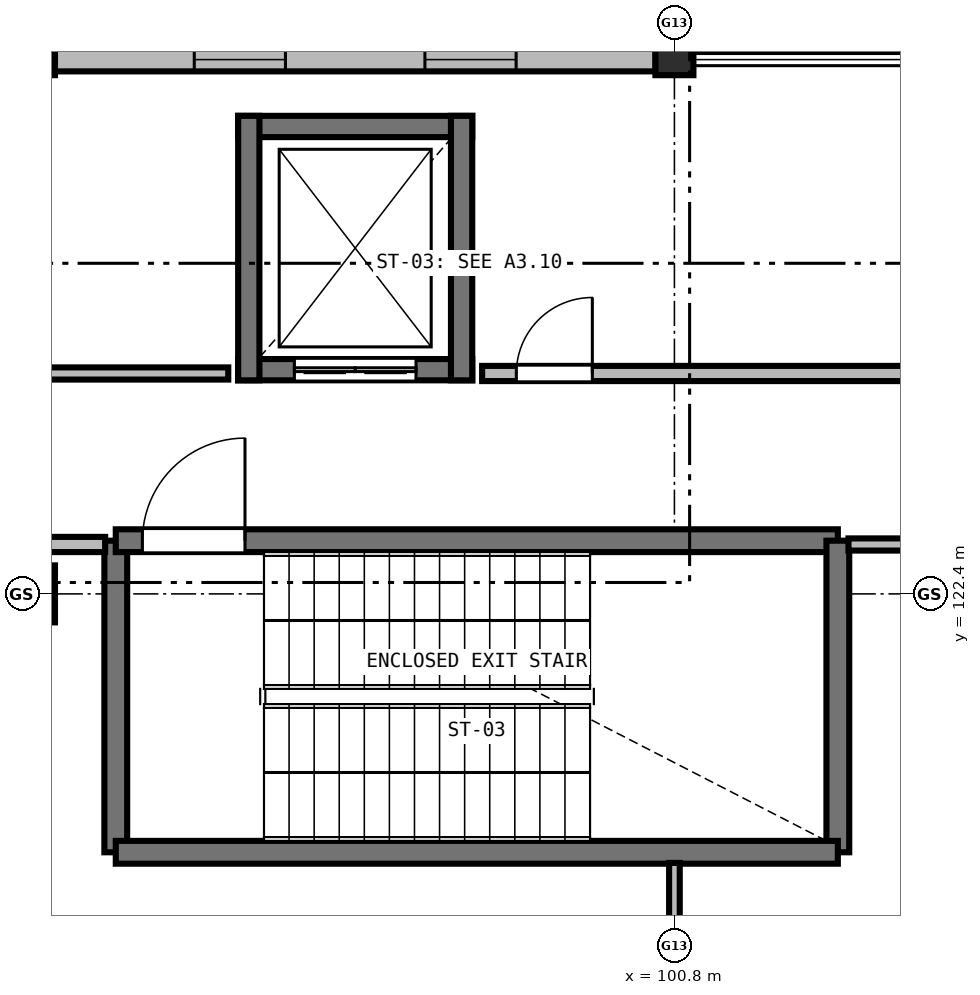
"""IFC4 building model, lengths in metres.
Left out: names, types, materials, properties, quantities, classifications, styles, units other than length and angle.
Written with IfcOpenShell. Run it as: python <this file> out.ifc"""

import sys

from ifc_helpers import new_model, si_unit, direction, frame, frame_2d, origin, origin_2d, place, context, subcontext, project, spatial, rectangle, extrude, element, fill, save


model = new_model("IFC4")
c1 = context("Model", 3, precision=1e-05, world=origin(), true_north=direction((0.0, 1.0)))
c2 = subcontext(c1, "Body", "Model", "MODEL_VIEW")
j1 = project(units=[si_unit("LENGTHUNIT", "METRE"), si_unit("PLANEANGLEUNIT", "RADIAN")], contexts=[c1])
p1 = place(None, origin())
s1 = spatial("IfcSite", under=j1, at=p1, CompositionType="ELEMENT")
p2 = place(p1, origin())
s2 = spatial("IfcBuilding", under=s1, at=p2, CompositionType="ELEMENT")
p3 = place(p2, frame((0.0, 0.0, 13.5)))
s3 = spatial("IfcBuildingStorey", under=s2, at=p3, CompositionType="ELEMENT", Elevation=13.5)
for number, where, z_axis, x_axis in (
    (1, (92.4, 122.4, 0.0), (0.0, 0.0, 1.0), (1.0, 0.0, 0.0)),
    (2, (92.4, 129.6, 0.0), (0.0, 0.0, 1.0), (1.0, 0.0, 0.0)),
    (3, (100.8, 129.6, 0.0), (0.0, 0.0, 1.0), (1.0, 0.0, 0.0)),
):
    element("IfcColumn", number, at=place(p3, frame(where, z_axis=z_axis, x_axis=x_axis)), inside=s3, PredefinedType="COLUMN", context=c2, shape_type="SweptSolid", body=[
        extrude(rectangle(XDim=0.5, YDim=0.75, at=origin_2d()), origin(), (0.0, 0.0, 1.0), 4.2),
    ])
p4 = place(p3, frame((92.648, 129.43, 0.0), z_axis=(0.0, 0.0, 1.0), x_axis=(1.0, 0.0, 0.0)))
e4 = element("IfcWall", 4, at=p4, inside=s3, PredefinedType="SOLIDWALL", context=c2, shape_type="SweptSolid", body=[
    extrude(rectangle(XDim=7.904, YDim=0.31, at=frame_2d((3.952, 0.0))), origin(), (0.0, 0.0, 1.0), 3.16),
])
p5 = place(p4, frame((1.835, 0.0, 0.95)))
e5 = element("IfcOpeningElement", 5, at=p5, cuts=e4, PredefinedType="OPENING", context=c2, shape_type="SweptSolid", body=[
    extrude(rectangle(XDim=1.2, YDim=1.8, at=frame_2d((0.6, 0.9))), frame((0.0, 0.165, 0.0), z_axis=(0.0, -1.0, 0.0), x_axis=(1.0, 0.0, 0.0)), (0.0, 0.0, 1.0), 0.33),
])
p6 = place(p4, frame((4.869, 0.0, 0.95)))
e6 = element("IfcOpeningElement", 6, at=p6, cuts=e4, PredefinedType="OPENING", context=c2, shape_type="SweptSolid", body=[
    extrude(rectangle(XDim=1.2, YDim=1.8, at=frame_2d((0.6, 0.9))), frame((0.0, 0.165, 0.0), z_axis=(0.0, -1.0, 0.0), x_axis=(1.0, 0.0, 0.0)), (0.0, 0.0, 1.0), 0.33),
])
p7 = place(p3, frame((93.45, 119.0, 0.0), z_axis=(0.0, 0.0, 1.0), x_axis=(0.0, 1.0, 0.0)))
e7 = element("IfcWall", 7, at=p7, inside=s3, PredefinedType="SHEAR", context=c2, shape_type="SweptSolid", body=[
    extrude(rectangle(XDim=4.1, YDim=0.3, at=frame_2d((2.05, 0.0))), origin(), (0.0, 0.0, 1.0), 3.88),
])
p8 = place(p3, frame((93.45, 123.1, 0.0), z_axis=(0.0, 0.0, 1.0), x_axis=(1.0, 0.0, 0.0)))
e8 = element("IfcWall", 8, at=p8, inside=s3, PredefinedType="SHEAR", context=c2, shape_type="SweptSolid", body=[
    extrude(rectangle(XDim=9.5, YDim=0.3, at=frame_2d((4.75, 0.0))), origin(), (0.0, 0.0, 1.0), 3.88),
])
p9 = place(p8, frame((0.35, 0.0, 0.0)))
e9 = element("IfcOpeningElement", 9, at=p9, cuts=e8, PredefinedType="OPENING", context=c2, shape_type="SweptSolid", body=[
    extrude(rectangle(XDim=1.35, YDim=2.2, at=frame_2d((0.675, 1.1))), frame((0.0, 0.16, 0.0), z_axis=(0.0, -1.0, 0.0), x_axis=(1.0, 0.0, 0.0)), (0.0, 0.0, 1.0), 0.32),
])
p10 = place(p3, frame((102.95, 123.1, 0.0), z_axis=(0.0, 0.0, 1.0), x_axis=(0.0, -1.0, 0.0)))
e10 = element("IfcWall", 10, at=p10, inside=s3, PredefinedType="SHEAR", context=c2, shape_type="SweptSolid", body=[
    extrude(rectangle(XDim=4.1, YDim=0.3, at=frame_2d((2.05, 0.0))), origin(), (0.0, 0.0, 1.0), 3.88),
])
p11 = place(p3, frame((102.95, 119.0, 0.0), z_axis=(0.0, 0.0, 1.0), x_axis=(-1.0, 0.0, 0.0)))
e11 = element("IfcWall", 11, at=p11, inside=s3, PredefinedType="SHEAR", context=c2, shape_type="SweptSolid", body=[
    extrude(rectangle(XDim=9.5, YDim=0.3, at=frame_2d((4.75, 0.0))), origin(), (0.0, 0.0, 1.0), 3.88),
])
p12 = place(p3, frame((98.14, 125.35, 0.0), z_axis=(0.0, 0.0, 1.0), x_axis=(-1.0, 0.0, 0.0)))
e12 = element("IfcWall", 12, at=p12, inside=s3, PredefinedType="SHEAR", context=c2, shape_type="SweptSolid", body=[
    extrude(rectangle(XDim=3.08, YDim=0.28, at=frame_2d((1.54, 0.0))), origin(), (0.0, 0.0, 1.0), 3.88),
])
p13 = place(p12, frame((0.74, 0.0, 0.0)))
e13 = element("IfcOpeningElement", 13, at=p13, cuts=e12, PredefinedType="OPENING", context=c2, shape_type="SweptSolid", body=[
    extrude(rectangle(XDim=1.6, YDim=2.2, at=frame_2d((0.8, 1.1))), frame((0.0, 0.15, 0.0), z_axis=(0.0, -1.0, 0.0), x_axis=(1.0, 0.0, 0.0)), (0.0, 0.0, 1.0), 0.3),
])
p14 = place(p3, frame((95.06, 128.55, 0.0), z_axis=(0.0, 0.0, 1.0), x_axis=(1.0, 0.0, 0.0)))
e14 = element("IfcWall", 14, at=p14, inside=s3, PredefinedType="SHEAR", context=c2, shape_type="SweptSolid", body=[
    extrude(rectangle(XDim=3.08, YDim=0.28, at=frame_2d((1.54, 0.0))), origin(), (0.0, 0.0, 1.0), 3.88),
])
for number, where, z_axis, x_axis in (
    (15, (95.2, 125.21, 0.0), (0.0, 0.0, 1.0), (0.0, 1.0, 0.0)),
    (16, (98.0, 128.69, 0.0), (0.0, 0.0, 1.0), (0.0, -1.0, 0.0)),
):
    element("IfcWall", number, at=place(p3, frame(where, z_axis=z_axis, x_axis=x_axis)), inside=s3, PredefinedType="SHEAR", context=c2, shape_type="SweptSolid", body=[
        extrude(rectangle(XDim=3.48, YDim=0.28, at=frame_2d((1.74, 0.0))), origin(), (0.0, 0.0, 1.0), 3.88),
    ])
p15 = place(p3, frame((92.4, 125.3, 0.0), z_axis=(0.0, 0.0, 1.0), x_axis=(1.0, 0.0, 0.0)))
e17 = element("IfcWall", 17, at=p15, inside=s3, PredefinedType="PARTITIONING", context=c2, shape_type="SweptSolid", body=[
    extrude(rectangle(XDim=2.53, YDim=0.16, at=frame_2d((1.265, 0.0))), origin(), (0.0, 0.0, 1.0), 3.355),
])
p16 = place(p3, frame((98.27, 125.3, 0.0), z_axis=(0.0, 0.0, 1.0), x_axis=(1.0, 0.0, 0.0)))
e18 = element("IfcWall", 18, at=p16, inside=s3, PredefinedType="SOLIDWALL", context=c2, shape_type="SweptSolid", body=[
    extrude(rectangle(XDim=35.91, YDim=0.2, at=frame_2d((17.955, 0.0))), origin(), (0.0, 0.0, 1.0), 3.355),
])
p17 = place(p16, frame((0.45, 0.0, 0.0)))
e19 = element("IfcOpeningElement", 19, at=p17, cuts=e18, PredefinedType="OPENING", context=c2, shape_type="SweptSolid", body=[
    extrude(rectangle(XDim=1.0, YDim=2.1, at=frame_2d((0.5, 1.05))), frame((0.0, 0.11, 0.0), z_axis=(0.0, -1.0, 0.0), x_axis=(1.0, 0.0, 0.0)), (0.0, 0.0, 1.0), 0.22),
])
p18 = place(p3, frame((93.31, 123.05, 0.0), z_axis=(0.0, 0.0, 1.0), x_axis=(-1.0, 0.0, 0.0)))
e20 = element("IfcWall", 20, at=p18, inside=s3, PredefinedType="SOLIDWALL", context=c2, shape_type="SweptSolid", body=[
    extrude(rectangle(XDim=32.22, YDim=0.2, at=frame_2d((16.11, 0.0))), origin(), (0.0, 0.0, 1.0), 3.355),
])
p19 = place(p18, frame((27.385, 0.0, 0.0)))
e21 = element("IfcOpeningElement", 21, at=p19, cuts=e20, PredefinedType="OPENING", context=c2, shape_type="SweptSolid", body=[
    extrude(rectangle(XDim=1.65, YDim=2.2, at=frame_2d((0.825, 1.1))), frame((0.0, 0.11, 0.0), z_axis=(0.0, -1.0, 0.0), x_axis=(1.0, 0.0, 0.0)), (0.0, 0.0, 1.0), 0.22),
])
p20 = place(p3, frame((100.8, 115.47, 0.0), z_axis=(0.0, 0.0, 1.0), x_axis=(0.0, 1.0, 0.0)))
e22 = element("IfcWall", 22, at=p20, inside=s3, PredefinedType="PARTITIONING", context=c2, shape_type="SweptSolid", body=[
    extrude(rectangle(XDim=3.39, YDim=0.14, at=frame_2d((1.695, 0.0))), origin(), (0.0, 0.0, 1.0), 3.155),
])
p21 = place(p3, frame((134.18, 123.05, 0.0), z_axis=(0.0, 0.0, 1.0), x_axis=(-1.0, 0.0, 0.0)))
e23 = element("IfcWall", 23, at=p21, inside=s3, PredefinedType="PARTITIONING", context=c2, shape_type="SweptSolid", body=[
    extrude(rectangle(XDim=31.09, YDim=0.16, at=frame_2d((15.545, 0.0))), origin(), (0.0, 0.0, 1.0), 3.355),
])
p22 = place(p21, frame((28.53, 0.0, 0.0)))
e24 = element("IfcOpeningElement", 24, at=p22, cuts=e23, PredefinedType="OPENING", context=c2, shape_type="SweptSolid", body=[
    extrude(rectangle(XDim=1.3, YDim=2.15, at=frame_2d((0.65, 1.075))), frame((0.0, 0.09, 0.0), z_axis=(0.0, -1.0, 0.0), x_axis=(1.0, 0.0, 0.0)), (0.0, 0.0, 1.0), 0.18),
])
p23 = place(p5, origin())
e25 = element("IfcWindow", 25, at=p23, inside=s3, PartitioningType="SINGLE_PANEL", PredefinedType="WINDOW", context=c2, shape_type="SweptSolid", body=[
    extrude(rectangle(XDim=1.2, YDim=1.8, at=frame_2d((0.6, 0.9))), frame((0.0, 0.03, 0.0), z_axis=(0.0, -1.0, 0.0), x_axis=(1.0, 0.0, 0.0)), (0.0, 0.0, 1.0), 0.06),
])
fill(e5, e25)
p24 = place(p6, origin())
e26 = element("IfcWindow", 26, at=p24, inside=s3, PartitioningType="SINGLE_PANEL", PredefinedType="WINDOW", context=c2, shape_type="SweptSolid", body=[
    extrude(rectangle(XDim=1.2, YDim=1.8, at=frame_2d((0.6, 0.9))), frame((0.0, 0.03, 0.0), z_axis=(0.0, -1.0, 0.0), x_axis=(1.0, 0.0, 0.0)), (0.0, 0.0, 1.0), 0.06),
])
fill(e6, e26)
p25 = place(p9, origin())
e27 = element("IfcDoor", 27, at=p25, inside=s3, OperationType="SINGLE_SWING_RIGHT", PredefinedType="DOOR", context=c2, shape_type="SweptSolid", body=[
    extrude(rectangle(XDim=1.35, YDim=2.2, at=frame_2d((0.675, 1.1))), frame((0.0, 0.025, 0.0), z_axis=(0.0, -1.0, 0.0), x_axis=(1.0, 0.0, 0.0)), (0.0, 0.0, 1.0), 0.05),
])
fill(e9, e27)
p26 = place(p13, origin())
e28 = element("IfcDoor", 28, at=p26, inside=s3, OperationType="DOUBLE_DOOR_SLIDING", PredefinedType="DOOR", context=c2, shape_type="SweptSolid", body=[
    extrude(rectangle(XDim=1.6, YDim=2.2, at=frame_2d((0.8, 1.1))), frame((0.0, 0.025, 0.0), z_axis=(0.0, -1.0, 0.0), x_axis=(1.0, 0.0, 0.0)), (0.0, 0.0, 1.0), 0.05),
])
fill(e13, e28)
p27 = place(p17, origin())
e29 = element("IfcDoor", 29, at=p27, inside=s3, OperationType="SINGLE_SWING_RIGHT", PredefinedType="DOOR", context=c2, shape_type="SweptSolid", body=[
    extrude(rectangle(XDim=1.0, YDim=2.1, at=frame_2d((0.5, 1.05))), frame((0.0, 0.025, 0.0), z_axis=(0.0, -1.0, 0.0), x_axis=(1.0, 0.0, 0.0)), (0.0, 0.0, 1.0), 0.05),
])
fill(e19, e29)
save(model, sys.argv[1])
